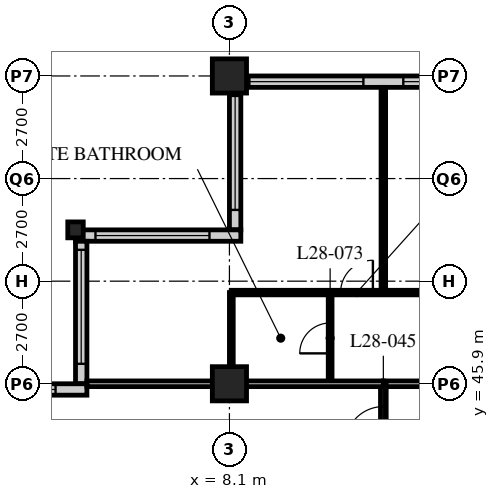
"""IFC4 building model, lengths in metres.
Left out: names, types, materials, properties, quantities, classifications, styles, units other than length and angle.
Written with IfcOpenShell. Run it as: python <this file> out.ifc"""

import sys

from ifc_helpers import new_model, si_unit, direction, frame, frame_2d, origin, origin_2d, place, context, subcontext, project, spatial, rectangle, hollow_rectangle, i_section, extrude, element, fill, save


model = new_model("IFC4")
c1 = context("Model", 3, precision=1e-05, world=origin(), true_north=direction((0.0, 1.0)))
c2 = subcontext(c1, "Body", "Model", "MODEL_VIEW")
j1 = project(units=[si_unit("LENGTHUNIT", "METRE"), si_unit("PLANEANGLEUNIT", "RADIAN")], contexts=[c1])
p1 = place(None, origin())
s1 = spatial("IfcSite", under=j1, at=p1, CompositionType="ELEMENT")
p2 = place(p1, origin())
s2 = spatial("IfcBuilding", under=s1, at=p2, CompositionType="ELEMENT")
p3 = place(p2, frame((0.0, 0.0, 113.6)))
s3 = spatial("IfcBuildingStorey", under=s2, at=p3, CompositionType="ELEMENT", Elevation=113.6)
p4 = place(p3, frame((4.05, 49.95, 0.0), z_axis=(0.0, 0.0, 1.0), x_axis=(1.0, 0.0, 0.0)))
e1 = element("IfcColumn", 1, at=p4, inside=s3, PredefinedType="COLUMN", context=c2, shape_type="SweptSolid", body=[
    extrude(i_section(OverallWidth=0.407, OverallDepth=0.419, WebThickness=0.031, FlangeThickness=0.049, FilletRadius=0.015, at=origin_2d()), origin(), (0.0, 0.0, 1.0), 3.4),
])
for number, where, z_axis, x_axis in (
    (2, (8.1, 45.9, 0.0), (0.0, 0.0, 1.0), (1.0, 0.0, 0.0)),
    (3, (8.1, 54.0, 0.0), (0.0, 0.0, 1.0), (1.0, 0.0, 0.0)),
):
    element("IfcColumn", number, at=place(p3, frame(where, z_axis=z_axis, x_axis=x_axis)), inside=s3, PredefinedType="COLUMN", context=c2, shape_type="SweptSolid", body=[
        extrude(hollow_rectangle(XDim=0.9, YDim=0.9, WallThickness=0.09, at=origin_2d()), origin(), (0.0, 0.0, 1.0), 3.4),
    ])
p5 = place(p3, frame((48.3, 53.85, 0.0), z_axis=(0.0, 0.0, 1.0), x_axis=(-1.0, 0.0, 0.0)))
e4 = element("IfcWall", 4, at=p5, inside=s3, PredefinedType="SOLIDWALL", context=c2, shape_type="SweptSolid", body=[
    extrude(rectangle(XDim=40.2, YDim=0.3, at=frame_2d((20.1, 0.0))), origin(), (0.0, 0.0, 1.0), 3.19),
])
p6 = place(p5, frame((0.225, 0.0, 0.9)))
e5 = element("IfcOpeningElement", 5, at=p6, cuts=e4, PredefinedType="OPENING", context=c2, shape_type="SweptSolid", body=[
    extrude(rectangle(XDim=3.0, YDim=2.0, at=frame_2d((1.5, 1.0))), frame((0.0, 0.16, 0.0), z_axis=(0.0, -1.0, 0.0), x_axis=(1.0, 0.0, 0.0)), (0.0, 0.0, 1.0), 0.32),
])
p7 = place(p5, frame((4.275, 0.0, 0.9)))
e6 = element("IfcOpeningElement", 6, at=p7, cuts=e4, PredefinedType="OPENING", context=c2, shape_type="SweptSolid", body=[
    extrude(rectangle(XDim=3.0, YDim=2.0, at=frame_2d((1.5, 1.0))), frame((0.0, 0.16, 0.0), z_axis=(0.0, -1.0, 0.0), x_axis=(1.0, 0.0, 0.0)), (0.0, 0.0, 1.0), 0.32),
])
p8 = place(p5, frame((8.325, 0.0, 0.9)))
e7 = element("IfcOpeningElement", 7, at=p8, cuts=e4, PredefinedType="OPENING", context=c2, shape_type="SweptSolid", body=[
    extrude(rectangle(XDim=3.0, YDim=2.0, at=frame_2d((1.5, 1.0))), frame((0.0, 0.16, 0.0), z_axis=(0.0, -1.0, 0.0), x_axis=(1.0, 0.0, 0.0)), (0.0, 0.0, 1.0), 0.32),
])
p9 = place(p5, frame((12.375, 0.0, 0.9)))
e8 = element("IfcOpeningElement", 8, at=p9, cuts=e4, PredefinedType="OPENING", context=c2, shape_type="SweptSolid", body=[
    extrude(rectangle(XDim=3.0, YDim=2.0, at=frame_2d((1.5, 1.0))), frame((0.0, 0.16, 0.0), z_axis=(0.0, -1.0, 0.0), x_axis=(1.0, 0.0, 0.0)), (0.0, 0.0, 1.0), 0.32),
])
p10 = place(p5, frame((16.425, 0.0, 0.9)))
e9 = element("IfcOpeningElement", 9, at=p10, cuts=e4, PredefinedType="OPENING", context=c2, shape_type="SweptSolid", body=[
    extrude(rectangle(XDim=3.0, YDim=2.0, at=frame_2d((1.5, 1.0))), frame((0.0, 0.16, 0.0), z_axis=(0.0, -1.0, 0.0), x_axis=(1.0, 0.0, 0.0)), (0.0, 0.0, 1.0), 0.32),
])
p11 = place(p5, frame((20.475, 0.0, 0.9)))
e10 = element("IfcOpeningElement", 10, at=p11, cuts=e4, PredefinedType="OPENING", context=c2, shape_type="SweptSolid", body=[
    extrude(rectangle(XDim=3.0, YDim=2.0, at=frame_2d((1.5, 1.0))), frame((0.0, 0.16, 0.0), z_axis=(0.0, -1.0, 0.0), x_axis=(1.0, 0.0, 0.0)), (0.0, 0.0, 1.0), 0.32),
])
p12 = place(p5, frame((24.525, 0.0, 0.9)))
e11 = element("IfcOpeningElement", 11, at=p12, cuts=e4, PredefinedType="OPENING", context=c2, shape_type="SweptSolid", body=[
    extrude(rectangle(XDim=3.0, YDim=2.0, at=frame_2d((1.5, 1.0))), frame((0.0, 0.16, 0.0), z_axis=(0.0, -1.0, 0.0), x_axis=(1.0, 0.0, 0.0)), (0.0, 0.0, 1.0), 0.32),
])
p13 = place(p5, frame((28.575, 0.0, 0.9)))
e12 = element("IfcOpeningElement", 12, at=p13, cuts=e4, PredefinedType="OPENING", context=c2, shape_type="SweptSolid", body=[
    extrude(rectangle(XDim=3.0, YDim=2.0, at=frame_2d((1.5, 1.0))), frame((0.0, 0.16, 0.0), z_axis=(0.0, -1.0, 0.0), x_axis=(1.0, 0.0, 0.0)), (0.0, 0.0, 1.0), 0.32),
])
p14 = place(p5, frame((32.625, 0.0, 0.9)))
e13 = element("IfcOpeningElement", 13, at=p14, cuts=e4, PredefinedType="OPENING", context=c2, shape_type="SweptSolid", body=[
    extrude(rectangle(XDim=3.0, YDim=2.0, at=frame_2d((1.5, 1.0))), frame((0.0, 0.16, 0.0), z_axis=(0.0, -1.0, 0.0), x_axis=(1.0, 0.0, 0.0)), (0.0, 0.0, 1.0), 0.32),
])
p15 = place(p5, frame((36.675, 0.0, 0.9)))
e14 = element("IfcOpeningElement", 14, at=p15, cuts=e4, PredefinedType="OPENING", context=c2, shape_type="SweptSolid", body=[
    extrude(rectangle(XDim=3.0, YDim=2.0, at=frame_2d((1.5, 1.0))), frame((0.0, 0.16, 0.0), z_axis=(0.0, -1.0, 0.0), x_axis=(1.0, 0.0, 0.0)), (0.0, 0.0, 1.0), 0.32),
])
p16 = place(p3, frame((8.25, 53.7, 0.0), z_axis=(0.0, 0.0, 1.0), x_axis=(0.0, -1.0, 0.0)))
e15 = element("IfcWall", 15, at=p16, inside=s3, PredefinedType="SOLIDWALL", context=c2, shape_type="SweptSolid", body=[
    extrude(rectangle(XDim=3.75, YDim=0.3, at=frame_2d((1.875, 0.0))), origin(), (0.0, 0.0, 1.0), 3.19),
])
p17 = place(p16, frame((0.225, 0.0, 0.9)))
e16 = element("IfcOpeningElement", 16, at=p17, cuts=e15, PredefinedType="OPENING", context=c2, shape_type="SweptSolid", body=[
    extrude(rectangle(XDim=3.0, YDim=1.5, at=frame_2d((1.5, 0.75))), frame((0.0, 0.16, 0.0), z_axis=(0.0, -1.0, 0.0), x_axis=(1.0, 0.0, 0.0)), (0.0, 0.0, 1.0), 0.32),
])
p18 = place(p3, frame((8.4, 49.8, 0.0), z_axis=(0.0, 0.0, 1.0), x_axis=(-1.0, 0.0, 0.0)))
e17 = element("IfcWall", 17, at=p18, inside=s3, PredefinedType="SOLIDWALL", context=c2, shape_type="SweptSolid", body=[
    extrude(rectangle(XDim=4.35, YDim=0.3, at=frame_2d((2.175, 0.0))), origin(), (0.0, 0.0, 1.0), 3.19),
])
p19 = place(p18, frame((0.825, 0.0, 0.9)))
e18 = element("IfcOpeningElement", 18, at=p19, cuts=e17, PredefinedType="OPENING", context=c2, shape_type="SweptSolid", body=[
    extrude(rectangle(XDim=3.0, YDim=1.5, at=frame_2d((1.5, 0.75))), frame((0.0, 0.16, 0.0), z_axis=(0.0, -1.0, 0.0), x_axis=(1.0, 0.0, 0.0)), (0.0, 0.0, 1.0), 0.32),
])
p20 = place(p3, frame((4.2, 49.65, 0.0), z_axis=(0.0, 0.0, 1.0), x_axis=(0.0, -1.0, 0.0)))
e19 = element("IfcWall", 19, at=p20, inside=s3, PredefinedType="SOLIDWALL", context=c2, shape_type="SweptSolid", body=[
    extrude(rectangle(XDim=3.75, YDim=0.3, at=frame_2d((1.875, 0.0))), origin(), (0.0, 0.0, 1.0), 3.19),
])
p21 = place(p20, frame((0.225, 0.0, 0.9)))
e20 = element("IfcOpeningElement", 20, at=p21, cuts=e19, PredefinedType="OPENING", context=c2, shape_type="SweptSolid", body=[
    extrude(rectangle(XDim=3.0, YDim=1.5, at=frame_2d((1.5, 0.75))), frame((0.0, 0.16, 0.0), z_axis=(0.0, -1.0, 0.0), x_axis=(1.0, 0.0, 0.0)), (0.0, 0.0, 1.0), 0.32),
])
p22 = place(p3, frame((4.35, 45.75, 0.0), z_axis=(0.0, 0.0, 1.0), x_axis=(-1.0, 0.0, 0.0)))
e21 = element("IfcWall", 21, at=p22, inside=s3, PredefinedType="SOLIDWALL", context=c2, shape_type="SweptSolid", body=[
    extrude(rectangle(XDim=4.35, YDim=0.3, at=frame_2d((2.175, 0.0))), origin(), (0.0, 0.0, 1.0), 3.19),
])
p23 = place(p22, frame((0.825, 0.0, 0.9)))
e22 = element("IfcOpeningElement", 22, at=p23, cuts=e21, PredefinedType="OPENING", context=c2, shape_type="SweptSolid", body=[
    extrude(rectangle(XDim=3.0, YDim=1.5, at=frame_2d((1.5, 0.75))), frame((0.0, 0.16, 0.0), z_axis=(0.0, -1.0, 0.0), x_axis=(1.0, 0.0, 0.0)), (0.0, 0.0, 1.0), 0.32),
])
p24 = place(p3, frame((12.15, 45.9, 0.0), z_axis=(0.0, 0.0, 1.0), x_axis=(1.0, 0.0, 0.0)))
e23 = element("IfcWall", 23, at=p24, inside=s3, PredefinedType="PARTITIONING", context=c2, shape_type="SweptSolid", body=[
    extrude(rectangle(XDim=32.4, YDim=0.15, at=frame_2d((16.2, 0.0))), origin(), (0.0, 0.0, 1.0), 2.578),
])
p25 = place(p24, frame((5.95, 0.0, 0.0)))
e24 = element("IfcOpeningElement", 24, at=p25, cuts=e23, PredefinedType="OPENING", context=c2, shape_type="SweptSolid", body=[
    extrude(rectangle(XDim=1.0, YDim=2.1, at=frame_2d((0.5, 1.05))), frame((0.0, 0.085, 0.0), z_axis=(0.0, -1.0, 0.0), x_axis=(1.0, 0.0, 0.0)), (0.0, 0.0, 1.0), 0.17),
])
p26 = place(p24, frame((14.05, 0.0, 0.0)))
e25 = element("IfcOpeningElement", 25, at=p26, cuts=e23, PredefinedType="OPENING", context=c2, shape_type="SweptSolid", body=[
    extrude(rectangle(XDim=1.0, YDim=2.1, at=frame_2d((0.5, 1.05))), frame((0.0, 0.085, 0.0), z_axis=(0.0, -1.0, 0.0), x_axis=(1.0, 0.0, 0.0)), (0.0, 0.0, 1.0), 0.17),
])
p27 = place(p24, frame((25.7, 0.0, 0.0)))
e26 = element("IfcOpeningElement", 26, at=p27, cuts=e23, PredefinedType="OPENING", context=c2, shape_type="SweptSolid", body=[
    extrude(rectangle(XDim=1.0, YDim=2.1, at=frame_2d((0.5, 1.05))), frame((0.0, 0.085, 0.0), z_axis=(0.0, -1.0, 0.0), x_axis=(1.0, 0.0, 0.0)), (0.0, 0.0, 1.0), 0.17),
])
p28 = place(p24, frame((29.875, 0.0, 0.0)))
e27 = element("IfcOpeningElement", 27, at=p28, cuts=e23, PredefinedType="OPENING", context=c2, shape_type="SweptSolid", body=[
    extrude(rectangle(XDim=1.0, YDim=2.1, at=frame_2d((0.5, 1.05))), frame((0.0, 0.085, 0.0), z_axis=(0.0, -1.0, 0.0), x_axis=(1.0, 0.0, 0.0)), (0.0, 0.0, 1.0), 0.17),
])
p29 = place(p24, frame((1.525, 0.0, 0.0)))
e28 = element("IfcOpeningElement", 28, at=p29, cuts=e23, PredefinedType="OPENING", context=c2, shape_type="SweptSolid", body=[
    extrude(rectangle(XDim=1.0, YDim=2.1, at=frame_2d((0.5, 1.05))), frame((0.0, 0.085, 0.0), z_axis=(0.0, -1.0, 0.0), x_axis=(1.0, 0.0, 0.0)), (0.0, 0.0, 1.0), 0.17),
])
p30 = place(p3, frame((12.15, 17.55, 0.0), z_axis=(0.0, 0.0, 1.0), x_axis=(0.0, 1.0, 0.0)))
e29 = element("IfcWall", 29, at=p30, inside=s3, PredefinedType="PARTITIONING", context=c2, shape_type="SweptSolid", body=[
    extrude(rectangle(XDim=28.35, YDim=0.15, at=frame_2d((14.175, 0.0))), origin(), (0.0, 0.0, 1.0), 3.19),
])
p31 = place(p30, frame((5.45, 0.0, 0.0)))
e30 = element("IfcOpeningElement", 30, at=p31, cuts=e29, PredefinedType="OPENING", context=c2, shape_type="SweptSolid", body=[
    extrude(rectangle(XDim=1.0, YDim=2.1, at=frame_2d((0.5, 1.05))), frame((0.0, 0.085, 0.0), z_axis=(0.0, -1.0, 0.0), x_axis=(1.0, 0.0, 0.0)), (0.0, 0.0, 1.0), 0.17),
])
p32 = place(p30, frame((13.55, 0.0, 0.0)))
e31 = element("IfcOpeningElement", 31, at=p32, cuts=e29, PredefinedType="OPENING", context=c2, shape_type="SweptSolid", body=[
    extrude(rectangle(XDim=1.0, YDim=2.1, at=frame_2d((0.5, 1.05))), frame((0.0, 0.085, 0.0), z_axis=(0.0, -1.0, 0.0), x_axis=(1.0, 0.0, 0.0)), (0.0, 0.0, 1.0), 0.17),
])
p33 = place(p30, frame((21.65, 0.0, 0.0)))
e32 = element("IfcOpeningElement", 32, at=p33, cuts=e29, PredefinedType="OPENING", context=c2, shape_type="SweptSolid", body=[
    extrude(rectangle(XDim=1.0, YDim=2.1, at=frame_2d((0.5, 1.05))), frame((0.0, 0.085, 0.0), z_axis=(0.0, -1.0, 0.0), x_axis=(1.0, 0.0, 0.0)), (0.0, 0.0, 1.0), 0.17),
])
p34 = place(p30, frame((26.75, 0.0, 0.0)))
e33 = element("IfcOpeningElement", 33, at=p34, cuts=e29, PredefinedType="OPENING", context=c2, shape_type="SweptSolid", body=[
    extrude(rectangle(XDim=1.0, YDim=2.1, at=frame_2d((0.5, 1.05))), frame((0.0, 0.085, 0.0), z_axis=(0.0, -1.0, 0.0), x_axis=(1.0, 0.0, 0.0)), (0.0, 0.0, 1.0), 0.17),
])
p35 = place(p3, frame((10.75, 45.9, 0.0), z_axis=(0.0, 0.0, 1.0), x_axis=(0.0, 1.0, 0.0)))
e34 = element("IfcWall", 34, at=p35, inside=s3, PredefinedType="PARTITIONING", context=c2, shape_type="SweptSolid", body=[
    extrude(rectangle(XDim=2.4, YDim=0.1, at=frame_2d((1.2, 0.0))), origin(), (0.0, 0.0, 1.0), 3.19),
])
p36 = place(p35, frame((0.8, 0.0, 0.0)))
e35 = element("IfcOpeningElement", 35, at=p36, cuts=e34, PredefinedType="OPENING", context=c2, shape_type="SweptSolid", body=[
    extrude(rectangle(XDim=0.8, YDim=2.1, at=frame_2d((0.4, 1.05))), frame((0.0, 0.06, 0.0), z_axis=(0.0, -1.0, 0.0), x_axis=(1.0, 0.0, 0.0)), (0.0, 0.0, 1.0), 0.12),
])
p37 = place(p3, frame((8.15, 45.9, 0.0), z_axis=(0.0, 0.0, 1.0), x_axis=(0.0, 1.0, 0.0)))
e36 = element("IfcWall", 36, at=p37, inside=s3, PredefinedType="PARTITIONING", context=c2, shape_type="SweptSolid", body=[
    extrude(rectangle(XDim=2.4, YDim=0.1, at=frame_2d((1.2, 0.0))), origin(), (0.0, 0.0, 1.0), 2.578),
])
p38 = place(p3, frame((8.15, 48.3, 0.0), z_axis=(0.0, 0.0, 1.0), x_axis=(1.0, 0.0, 0.0)))
e37 = element("IfcWall", 37, at=p38, inside=s3, PredefinedType="PARTITIONING", context=c2, shape_type="SweptSolid", body=[
    extrude(rectangle(XDim=8.05, YDim=0.12, at=frame_2d((4.025, 0.0))), origin(), (0.0, 0.0, 1.0), 3.19),
])
p39 = place(p38, frame((6.725, 0.0, 0.0)))
e38 = element("IfcOpeningElement", 38, at=p39, cuts=e37, PredefinedType="OPENING", context=c2, shape_type="SweptSolid", body=[
    extrude(rectangle(XDim=0.85, YDim=2.1, at=frame_2d((0.425, 1.05))), frame((0.0, 0.07, 0.0), z_axis=(0.0, -1.0, 0.0), x_axis=(1.0, 0.0, 0.0)), (0.0, 0.0, 1.0), 0.14),
])
p40 = place(p38, frame((2.875, 0.0, 0.0)))
e39 = element("IfcOpeningElement", 39, at=p40, cuts=e37, PredefinedType="OPENING", context=c2, shape_type="SweptSolid", body=[
    extrude(rectangle(XDim=0.85, YDim=2.1, at=frame_2d((0.425, 1.05))), frame((0.0, 0.07, 0.0), z_axis=(0.0, -1.0, 0.0), x_axis=(1.0, 0.0, 0.0)), (0.0, 0.0, 1.0), 0.14),
])
p41 = place(p3, frame((12.15, 48.3, 0.0), z_axis=(0.0, 0.0, 1.0), x_axis=(0.0, 1.0, 0.0)))
e40 = element("IfcWall", 40, at=p41, inside=s3, PredefinedType="PARTITIONING", context=c2, shape_type="SweptSolid", body=[
    extrude(rectangle(XDim=5.4, YDim=0.12, at=frame_2d((2.7, 0.0))), origin(), (0.0, 0.0, 1.0), 3.19),
])
p42 = place(p3, frame((4.35, 45.9, 0.0), z_axis=(0.0, 0.0, 1.0), x_axis=(1.0, 0.0, 0.0)))
e41 = element("IfcWall", 41, at=p42, inside=s3, PredefinedType="PARTITIONING", context=c2, shape_type="SweptSolid", body=[
    extrude(rectangle(XDim=7.8, YDim=0.15, at=frame_2d((3.9, 0.0))), origin(), (0.0, 0.0, 1.0), 2.578),
])
p43 = place(p14, origin())
e42 = element("IfcWindow", 42, at=p43, inside=s3, PartitioningType="SINGLE_PANEL", PredefinedType="WINDOW", context=c2, shape_type="SweptSolid", body=[
    extrude(rectangle(XDim=3.0, YDim=2.0, at=frame_2d((1.5, 1.0))), frame((0.0, 0.03, 0.0), z_axis=(0.0, -1.0, 0.0), x_axis=(1.0, 0.0, 0.0)), (0.0, 0.0, 1.0), 0.06),
])
fill(e13, e42)
p44 = place(p15, origin())
e43 = element("IfcWindow", 43, at=p44, inside=s3, PartitioningType="SINGLE_PANEL", PredefinedType="WINDOW", context=c2, shape_type="SweptSolid", body=[
    extrude(rectangle(XDim=3.0, YDim=2.0, at=frame_2d((1.5, 1.0))), frame((0.0, 0.03, 0.0), z_axis=(0.0, -1.0, 0.0), x_axis=(1.0, 0.0, 0.0)), (0.0, 0.0, 1.0), 0.06),
])
fill(e14, e43)
p45 = place(p17, origin())
e44 = element("IfcWindow", 44, at=p45, inside=s3, PartitioningType="SINGLE_PANEL", PredefinedType="WINDOW", context=c2, shape_type="SweptSolid", body=[
    extrude(rectangle(XDim=3.0, YDim=1.5, at=frame_2d((1.5, 0.75))), frame((0.0, 0.03, 0.0), z_axis=(0.0, -1.0, 0.0), x_axis=(1.0, 0.0, 0.0)), (0.0, 0.0, 1.0), 0.06),
])
fill(e16, e44)
p46 = place(p19, origin())
e45 = element("IfcWindow", 45, at=p46, inside=s3, PartitioningType="SINGLE_PANEL", PredefinedType="WINDOW", context=c2, shape_type="SweptSolid", body=[
    extrude(rectangle(XDim=3.0, YDim=1.5, at=frame_2d((1.5, 0.75))), frame((0.0, 0.03, 0.0), z_axis=(0.0, -1.0, 0.0), x_axis=(1.0, 0.0, 0.0)), (0.0, 0.0, 1.0), 0.06),
])
fill(e18, e45)
p47 = place(p21, origin())
e46 = element("IfcWindow", 46, at=p47, inside=s3, PartitioningType="SINGLE_PANEL", PredefinedType="WINDOW", context=c2, shape_type="SweptSolid", body=[
    extrude(rectangle(XDim=3.0, YDim=1.5, at=frame_2d((1.5, 0.75))), frame((0.0, 0.03, 0.0), z_axis=(0.0, -1.0, 0.0), x_axis=(1.0, 0.0, 0.0)), (0.0, 0.0, 1.0), 0.06),
])
fill(e20, e46)
p48 = place(p23, origin())
e47 = element("IfcWindow", 47, at=p48, inside=s3, PartitioningType="SINGLE_PANEL", PredefinedType="WINDOW", context=c2, shape_type="SweptSolid", body=[
    extrude(rectangle(XDim=3.0, YDim=1.5, at=frame_2d((1.5, 0.75))), frame((0.0, 0.03, 0.0), z_axis=(0.0, -1.0, 0.0), x_axis=(1.0, 0.0, 0.0)), (0.0, 0.0, 1.0), 0.06),
])
fill(e22, e47)
p49 = place(p34, origin())
e48 = element("IfcDoor", 48, at=p49, inside=s3, OperationType="SINGLE_SWING_LEFT", PredefinedType="DOOR", context=c2, shape_type="SweptSolid", body=[
    extrude(rectangle(XDim=1.0, YDim=2.1, at=frame_2d((0.5, 1.05))), frame((0.0, 0.025, 0.0), z_axis=(0.0, -1.0, 0.0), x_axis=(1.0, 0.0, 0.0)), (0.0, 0.0, 1.0), 0.05),
])
fill(e33, e48)
p50 = place(p36, origin())
e49 = element("IfcDoor", 49, at=p50, inside=s3, OperationType="SINGLE_SWING_LEFT", PredefinedType="DOOR", context=c2, shape_type="SweptSolid", body=[
    extrude(rectangle(XDim=0.8, YDim=2.1, at=frame_2d((0.4, 1.05))), frame((0.0, 0.025, 0.0), z_axis=(0.0, -1.0, 0.0), x_axis=(1.0, 0.0, 0.0)), (0.0, 0.0, 1.0), 0.05),
])
fill(e35, e49)
p51 = place(p40, origin())
e50 = element("IfcDoor", 50, at=p51, inside=s3, OperationType="SINGLE_SWING_RIGHT", PredefinedType="DOOR", context=c2, shape_type="SweptSolid", body=[
    extrude(rectangle(XDim=0.85, YDim=2.1, at=frame_2d((0.425, 1.05))), frame((0.0, 0.025, 0.0), z_axis=(0.0, -1.0, 0.0), x_axis=(1.0, 0.0, 0.0)), (0.0, 0.0, 1.0), 0.05),
])
fill(e39, e50)
save(model, sys.argv[1])
